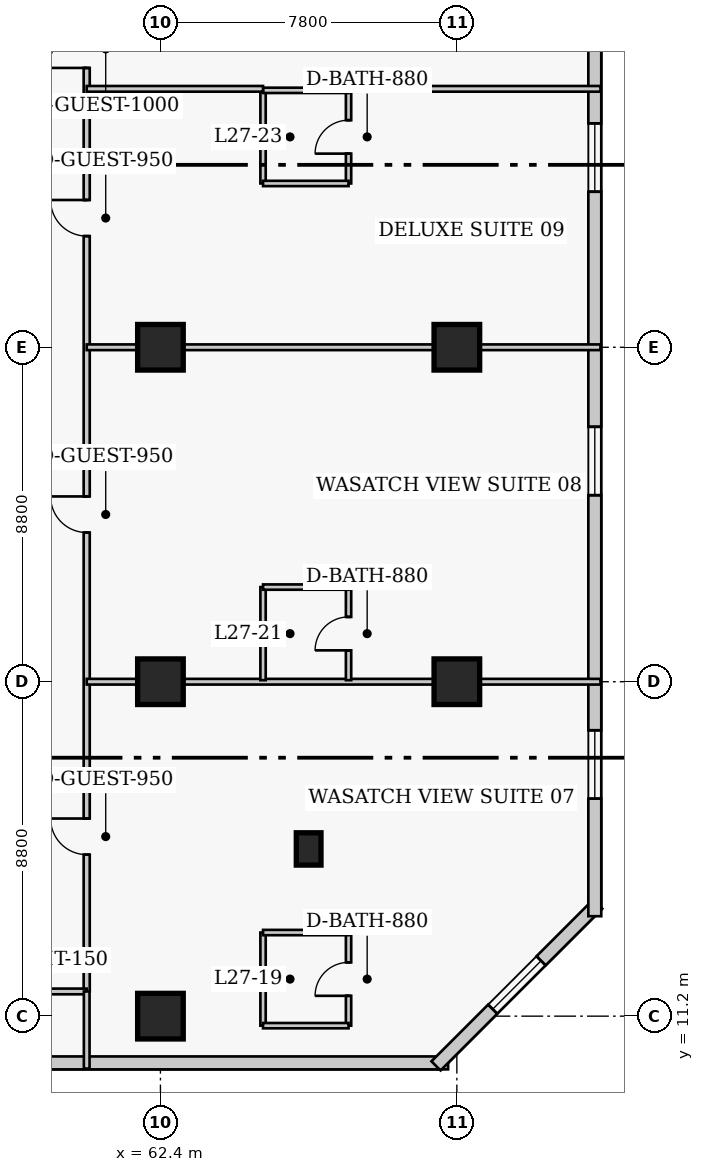
"""IFC4 building model, lengths in metres.
Left out: names, types, materials, properties, quantities, classifications, styles, units other than length and angle.
Written with IfcOpenShell. Run it as: python <this file> out.ifc"""

import sys

from ifc_helpers import new_model, si_unit, direction, frame, frame_2d, origin, origin_2d, place, context, subcontext, project, spatial, rectangle, extrude, element, fill, save


model = new_model("IFC4")
c1 = context("Model", 3, precision=1e-05, world=origin(), true_north=direction((0.0, 1.0)))
c2 = subcontext(c1, "Body", "Model", "MODEL_VIEW")
j1 = project(units=[si_unit("LENGTHUNIT", "METRE"), si_unit("PLANEANGLEUNIT", "RADIAN")], contexts=[c1])
p1 = place(None, origin())
s1 = spatial("IfcSite", under=j1, at=p1, CompositionType="ELEMENT")
p2 = place(p1, origin())
s2 = spatial("IfcBuilding", under=s1, at=p2, CompositionType="ELEMENT")
p3 = place(p2, frame((0.0, 0.0, 110.8)))
s3 = spatial("IfcBuildingStorey", under=s2, at=p3, CompositionType="ELEMENT", Elevation=110.8)
for number, where, z_axis, x_axis in (
    (1, (62.4, 11.2, 0.0), (0.0, 0.0, 1.0), (1.0, 0.0, 0.0)),
    (2, (62.4, 20.0, 0.0), (0.0, 0.0, 1.0), (1.0, 0.0, 0.0)),
    (3, (62.4, 28.8, 0.0), (0.0, 0.0, 1.0), (1.0, 0.0, 0.0)),
    (4, (70.2, 20.0, 0.0), (0.0, 0.0, 1.0), (1.0, 0.0, 0.0)),
    (5, (70.2, 28.8, 0.0), (0.0, 0.0, 1.0), (1.0, 0.0, 0.0)),
):
    element("IfcColumn", number, at=place(p3, frame(where, z_axis=z_axis, x_axis=x_axis)), inside=s3, PredefinedType="COLUMN", context=c2, shape_type="SweptSolid", body=[
        extrude(rectangle(XDim=1.2, YDim=1.2, at=origin_2d()), origin(), (0.0, 0.0, 1.0), 3.8),
    ])
p4 = place(p3, frame((66.3, 15.6, 0.0), z_axis=(0.0, 0.0, 1.0), x_axis=(1.0, 0.0, 0.0)))
e6 = element("IfcColumn", 6, at=p4, inside=s3, PredefinedType="PILASTER", context=c2, shape_type="SweptSolid", body=[
    extrude(rectangle(XDim=0.65, YDim=0.85, at=origin_2d()), origin(), (0.0, 0.0, 1.0), 3.8),
])
p5 = place(p3, frame((41.68, 9.97, 0.0), z_axis=(0.0, 0.0, 1.0), x_axis=(1.0, 0.0, 0.0)))
e7 = element("IfcWall", 7, at=p5, inside=s3, PredefinedType="SOLIDWALL", context=c2, shape_type="SweptSolid", body=[
    extrude(rectangle(XDim=28.29, YDim=0.34, at=frame_2d((14.145, 0.0))), origin(), (0.0, 0.0, 1.0), 3.54),
])
p6 = place(p5, frame((8.32, 0.0, 0.0)))
e8 = element("IfcOpeningElement", 8, at=p6, cuts=e7, PredefinedType="OPENING", context=c2, shape_type="SweptSolid", body=[
    extrude(rectangle(XDim=1.4, YDim=2.15, at=frame_2d((0.7, 1.075))), frame((0.0, 0.18, 0.0), z_axis=(0.0, -1.0, 0.0), x_axis=(1.0, 0.0, 0.0)), (0.0, 0.0, 1.0), 0.36),
])
p7 = place(p5, frame((2.665, 0.0, 0.85)))
e9 = element("IfcOpeningElement", 9, at=p7, cuts=e7, PredefinedType="OPENING", context=c2, shape_type="SweptSolid", body=[
    extrude(rectangle(XDim=1.8, YDim=1.8, at=frame_2d((0.9, 0.9))), frame((0.0, 0.18, 0.0), z_axis=(0.0, -1.0, 0.0), x_axis=(1.0, 0.0, 0.0)), (0.0, 0.0, 1.0), 0.36),
])
p8 = place(p5, frame((13.895, 0.0, 0.85)))
e10 = element("IfcOpeningElement", 10, at=p8, cuts=e7, PredefinedType="OPENING", context=c2, shape_type="SweptSolid", body=[
    extrude(rectangle(XDim=1.8, YDim=1.8, at=frame_2d((0.9, 0.9))), frame((0.0, 0.18, 0.0), z_axis=(0.0, -1.0, 0.0), x_axis=(1.0, 0.0, 0.0)), (0.0, 0.0, 1.0), 0.36),
])
p9 = place(p3, frame((69.652, 9.892, 0.0), z_axis=(0.0, 0.0, 1.0), x_axis=(0.707106781187, 0.707106781187, 0.0)))
e11 = element("IfcWall", 11, at=p9, inside=s3, PredefinedType="SOLIDWALL", context=c2, shape_type="SweptSolid", body=[
    extrude(rectangle(XDim=6.02, YDim=0.34, at=frame_2d((3.01, 0.0))), origin(), (0.0, 0.0, 1.0), 3.54),
])
p10 = place(p9, frame((2.11, 0.0, 0.85)))
e12 = element("IfcOpeningElement", 12, at=p10, cuts=e11, PredefinedType="OPENING", context=c2, shape_type="SweptSolid", body=[
    extrude(rectangle(XDim=1.8, YDim=1.8, at=frame_2d((0.9, 0.9))), frame((0.0, 0.18, 0.0), z_axis=(0.0, -1.0, 0.0), x_axis=(1.0, 0.0, 0.0)), (0.0, 0.0, 1.0), 0.36),
])
p11 = place(p3, frame((73.83, 13.83, 0.0), z_axis=(0.0, 0.0, 1.0), x_axis=(0.0, 1.0, 0.0)))
e13 = element("IfcWall", 13, at=p11, inside=s3, PredefinedType="SOLIDWALL", context=c2, shape_type="SweptSolid", body=[
    extrude(rectangle(XDim=31.94, YDim=0.34, at=frame_2d((15.97, 0.0))), origin(), (0.0, 0.0, 1.0), 3.54),
])
p12 = place(p11, frame((3.093, 0.0, 0.85)))
e14 = element("IfcOpeningElement", 14, at=p12, cuts=e13, PredefinedType="OPENING", context=c2, shape_type="SweptSolid", body=[
    extrude(rectangle(XDim=1.8, YDim=1.8, at=frame_2d((0.9, 0.9))), frame((0.0, 0.18, 0.0), z_axis=(0.0, -1.0, 0.0), x_axis=(1.0, 0.0, 0.0)), (0.0, 0.0, 1.0), 0.36),
])
p13 = place(p11, frame((11.077, 0.0, 0.85)))
e15 = element("IfcOpeningElement", 15, at=p13, cuts=e13, PredefinedType="OPENING", context=c2, shape_type="SweptSolid", body=[
    extrude(rectangle(XDim=1.8, YDim=1.8, at=frame_2d((0.9, 0.9))), frame((0.0, 0.18, 0.0), z_axis=(0.0, -1.0, 0.0), x_axis=(1.0, 0.0, 0.0)), (0.0, 0.0, 1.0), 0.36),
])
p14 = place(p11, frame((19.062, 0.0, 0.85)))
e16 = element("IfcOpeningElement", 16, at=p14, cuts=e13, PredefinedType="OPENING", context=c2, shape_type="SweptSolid", body=[
    extrude(rectangle(XDim=1.8, YDim=1.8, at=frame_2d((0.9, 0.9))), frame((0.0, 0.18, 0.0), z_axis=(0.0, -1.0, 0.0), x_axis=(1.0, 0.0, 0.0)), (0.0, 0.0, 1.0), 0.36),
])
p15 = place(p11, frame((27.048, 0.0, 0.85)))
e17 = element("IfcOpeningElement", 17, at=p15, cuts=e13, PredefinedType="OPENING", context=c2, shape_type="SweptSolid", body=[
    extrude(rectangle(XDim=1.8, YDim=1.8, at=frame_2d((0.9, 0.9))), frame((0.0, 0.18, 0.0), z_axis=(0.0, -1.0, 0.0), x_axis=(1.0, 0.0, 0.0)), (0.0, 0.0, 1.0), 0.36),
])
p16 = place(p3, frame((60.46, 11.85, 0.0), z_axis=(0.0, 0.0, 1.0), x_axis=(0.0, 1.0, 0.0)))
e18 = element("IfcWall", 18, at=p16, inside=s3, PredefinedType="PARTITIONING", context=c2, shape_type="SweptSolid", body=[
    extrude(rectangle(XDim=28.8, YDim=0.16, at=frame_2d((14.4, 0.0))), origin(), (0.0, 0.0, 1.0), 3.54),
])
p17 = place(p16, frame((3.6, 0.0, 0.0)))
e19 = element("IfcOpeningElement", 19, at=p17, cuts=e18, PredefinedType="OPENING", context=c2, shape_type="SweptSolid", body=[
    extrude(rectangle(XDim=0.95, YDim=2.1, at=frame_2d((0.475, 1.05))), frame((0.0, 0.09, 0.0), z_axis=(0.0, -1.0, 0.0), x_axis=(1.0, 0.0, 0.0)), (0.0, 0.0, 1.0), 0.18),
])
p18 = place(p16, frame((12.075, 0.0, 0.0)))
e20 = element("IfcOpeningElement", 20, at=p18, cuts=e18, PredefinedType="OPENING", context=c2, shape_type="SweptSolid", body=[
    extrude(rectangle(XDim=0.95, YDim=2.1, at=frame_2d((0.475, 1.05))), frame((0.0, 0.09, 0.0), z_axis=(0.0, -1.0, 0.0), x_axis=(1.0, 0.0, 0.0)), (0.0, 0.0, 1.0), 0.18),
])
p19 = place(p16, frame((19.875, 0.0, 0.0)))
e21 = element("IfcOpeningElement", 21, at=p19, cuts=e18, PredefinedType="OPENING", context=c2, shape_type="SweptSolid", body=[
    extrude(rectangle(XDim=0.95, YDim=2.1, at=frame_2d((0.475, 1.05))), frame((0.0, 0.09, 0.0), z_axis=(0.0, -1.0, 0.0), x_axis=(1.0, 0.0, 0.0)), (0.0, 0.0, 1.0), 0.18),
])
p20 = place(p16, frame((24.3, 0.0, 0.0)))
e22 = element("IfcOpeningElement", 22, at=p20, cuts=e18, PredefinedType="OPENING", context=c2, shape_type="SweptSolid", body=[
    extrude(rectangle(XDim=1.0, YDim=2.15, at=frame_2d((0.5, 1.075))), frame((0.0, 0.09, 0.0), z_axis=(0.0, -1.0, 0.0), x_axis=(1.0, 0.0, 0.0)), (0.0, 0.0, 1.0), 0.18),
])
p21 = place(p3, frame((58.24, 11.85, 0.0), z_axis=(0.0, 0.0, 1.0), x_axis=(1.0, 0.0, 0.0)))
e23 = element("IfcWall", 23, at=p21, inside=s3, PredefinedType="PARTITIONING", context=c2, shape_type="SweptSolid", body=[
    extrude(rectangle(XDim=2.22, YDim=0.15, at=frame_2d((1.11, 0.0))), origin(), (0.0, 0.0, 1.0), 3.54),
])
p22 = place(p3, frame((60.46, 9.82, 0.0), z_axis=(0.0, 0.0, 1.0), x_axis=(0.0, 1.0, 0.0)))
e24 = element("IfcWall", 24, at=p22, inside=s3, PredefinedType="PARTITIONING", context=c2, shape_type="SweptSolid", body=[
    extrude(rectangle(XDim=2.03, YDim=0.15, at=frame_2d((1.015, 0.0))), origin(), (0.0, 0.0, 1.0), 3.54),
])
p23 = place(p3, frame((65.1, 10.95, 0.0), z_axis=(0.0, 0.0, 1.0), x_axis=(0.0, 1.0, 0.0)))
e25 = element("IfcWall", 25, at=p23, inside=s3, PredefinedType="PLUMBINGWALL", context=c2, shape_type="SweptSolid", body=[
    extrude(rectangle(XDim=2.45, YDim=0.14, at=frame_2d((1.225, 0.0))), origin(), (0.0, 0.0, 1.0), 3.54),
])
p24 = place(p3, frame((67.35, 10.95, 0.0), z_axis=(0.0, 0.0, 1.0), x_axis=(0.0, 1.0, 0.0)))
e26 = element("IfcWall", 26, at=p24, inside=s3, PredefinedType="PLUMBINGWALL", context=c2, shape_type="SweptSolid", body=[
    extrude(rectangle(XDim=2.45, YDim=0.14, at=frame_2d((1.225, 0.0))), origin(), (0.0, 0.0, 1.0), 3.54),
])
p25 = place(p24, frame((0.785, 0.0, 0.0)))
e27 = element("IfcOpeningElement", 27, at=p25, cuts=e26, PredefinedType="OPENING", context=c2, shape_type="SweptSolid", body=[
    extrude(rectangle(XDim=0.88, YDim=2.05, at=frame_2d((0.44, 1.025))), frame((0.0, 0.08, 0.0), z_axis=(0.0, -1.0, 0.0), x_axis=(1.0, 0.0, 0.0)), (0.0, 0.0, 1.0), 0.16),
])
for number, where, z_axis, x_axis in (
    (28, (65.1, 10.95, 0.0), (0.0, 0.0, 1.0), (1.0, 0.0, 0.0)),
    (29, (65.1, 13.4, 0.0), (0.0, 0.0, 1.0), (1.0, 0.0, 0.0)),
):
    element("IfcWall", number, at=place(p3, frame(where, z_axis=z_axis, x_axis=x_axis)), inside=s3, PredefinedType="PLUMBINGWALL", context=c2, shape_type="SweptSolid", body=[
        extrude(rectangle(XDim=2.25, YDim=0.14, at=frame_2d((1.125, 0.0))), origin(), (0.0, 0.0, 1.0), 3.54),
    ])
p26 = place(p3, frame((60.46, 20.0, 0.0), z_axis=(0.0, 0.0, 1.0), x_axis=(1.0, 0.0, 0.0)))
e30 = element("IfcWall", 30, at=p26, inside=s3, PredefinedType="PARTITIONING", context=c2, shape_type="SweptSolid", body=[
    extrude(rectangle(XDim=13.52, YDim=0.15, at=frame_2d((6.76, 0.0))), origin(), (0.0, 0.0, 1.0), 2.679),
])
p27 = place(p3, frame((65.1, 20.04, 0.0), z_axis=(0.0, 0.0, 1.0), x_axis=(0.0, 1.0, 0.0)))
e31 = element("IfcWall", 31, at=p27, inside=s3, PredefinedType="PLUMBINGWALL", context=c2, shape_type="SweptSolid", body=[
    extrude(rectangle(XDim=2.45, YDim=0.14, at=frame_2d((1.225, 0.0))), origin(), (0.0, 0.0, 1.0), 3.54),
])
p28 = place(p3, frame((67.35, 20.04, 0.0), z_axis=(0.0, 0.0, 1.0), x_axis=(0.0, 1.0, 0.0)))
e32 = element("IfcWall", 32, at=p28, inside=s3, PredefinedType="PLUMBINGWALL", context=c2, shape_type="SweptSolid", body=[
    extrude(rectangle(XDim=2.45, YDim=0.14, at=frame_2d((1.225, 0.0))), origin(), (0.0, 0.0, 1.0), 3.54),
])
p29 = place(p28, frame((0.785, 0.0, 0.0)))
e33 = element("IfcOpeningElement", 33, at=p29, cuts=e32, PredefinedType="OPENING", context=c2, shape_type="SweptSolid", body=[
    extrude(rectangle(XDim=0.88, YDim=2.05, at=frame_2d((0.44, 1.025))), frame((0.0, 0.08, 0.0), z_axis=(0.0, -1.0, 0.0), x_axis=(1.0, 0.0, 0.0)), (0.0, 0.0, 1.0), 0.16),
])
p30 = place(p3, frame((65.1, 22.49, 0.0), z_axis=(0.0, 0.0, 1.0), x_axis=(1.0, 0.0, 0.0)))
e34 = element("IfcWall", 34, at=p30, inside=s3, PredefinedType="PLUMBINGWALL", context=c2, shape_type="SweptSolid", body=[
    extrude(rectangle(XDim=2.25, YDim=0.14, at=frame_2d((1.125, 0.0))), origin(), (0.0, 0.0, 1.0), 3.54),
])
p31 = place(p3, frame((60.46, 28.8, 0.0), z_axis=(0.0, 0.0, 1.0), x_axis=(1.0, 0.0, 0.0)))
e35 = element("IfcWall", 35, at=p31, inside=s3, PredefinedType="PARTITIONING", context=c2, shape_type="SweptSolid", body=[
    extrude(rectangle(XDim=13.52, YDim=0.15, at=frame_2d((6.76, 0.0))), origin(), (0.0, 0.0, 1.0), 2.679),
])
p32 = place(p3, frame((65.1, 33.11, 0.0), z_axis=(0.0, 0.0, 1.0), x_axis=(0.0, 1.0, 0.0)))
e36 = element("IfcWall", 36, at=p32, inside=s3, PredefinedType="PLUMBINGWALL", context=c2, shape_type="SweptSolid", body=[
    extrude(rectangle(XDim=2.45, YDim=0.14, at=frame_2d((1.225, 0.0))), origin(), (0.0, 0.0, 1.0), 3.54),
])
p33 = place(p3, frame((67.35, 33.11, 0.0), z_axis=(0.0, 0.0, 1.0), x_axis=(0.0, 1.0, 0.0)))
e37 = element("IfcWall", 37, at=p33, inside=s3, PredefinedType="PLUMBINGWALL", context=c2, shape_type="SweptSolid", body=[
    extrude(rectangle(XDim=2.45, YDim=0.14, at=frame_2d((1.225, 0.0))), origin(), (0.0, 0.0, 1.0), 3.54),
])
p34 = place(p33, frame((0.785, 0.0, 0.0)))
e38 = element("IfcOpeningElement", 38, at=p34, cuts=e37, PredefinedType="OPENING", context=c2, shape_type="SweptSolid", body=[
    extrude(rectangle(XDim=0.88, YDim=2.05, at=frame_2d((0.44, 1.025))), frame((0.0, 0.08, 0.0), z_axis=(0.0, -1.0, 0.0), x_axis=(1.0, 0.0, 0.0)), (0.0, 0.0, 1.0), 0.16),
])
for number, where, z_axis, x_axis in (
    (39, (65.1, 33.11, 0.0), (0.0, 0.0, 1.0), (1.0, 0.0, 0.0)),
    (40, (65.1, 35.56, 0.0), (0.0, 0.0, 1.0), (1.0, 0.0, 0.0)),
):
    element("IfcWall", number, at=place(p3, frame(where, z_axis=z_axis, x_axis=x_axis)), inside=s3, PredefinedType="PLUMBINGWALL", context=c2, shape_type="SweptSolid", body=[
        extrude(rectangle(XDim=2.25, YDim=0.14, at=frame_2d((1.125, 0.0))), origin(), (0.0, 0.0, 1.0), 3.54),
    ])
p35 = place(p3, frame((60.46, 35.6, 0.0), z_axis=(0.0, 0.0, 1.0), x_axis=(1.0, 0.0, 0.0)))
e41 = element("IfcWall", 41, at=p35, inside=s3, PredefinedType="PARTITIONING", context=c2, shape_type="SweptSolid", body=[
    extrude(rectangle(XDim=4.64, YDim=0.15, at=frame_2d((2.32, 0.0))), origin(), (0.0, 0.0, 1.0), 3.54),
])
p36 = place(p3, frame((67.35, 35.6, 0.0), z_axis=(0.0, 0.0, 1.0), x_axis=(1.0, 0.0, 0.0)))
e42 = element("IfcWall", 42, at=p36, inside=s3, PredefinedType="PARTITIONING", context=c2, shape_type="SweptSolid", body=[
    extrude(rectangle(XDim=6.63, YDim=0.15, at=frame_2d((3.315, 0.0))), origin(), (0.0, 0.0, 1.0), 3.54),
])
p37 = place(p10, origin())
e43 = element("IfcWindow", 43, at=p37, inside=s3, PartitioningType="SINGLE_PANEL", PredefinedType="WINDOW", context=c2, shape_type="SweptSolid", body=[
    extrude(rectangle(XDim=1.8, YDim=1.8, at=frame_2d((0.9, 0.9))), frame((0.0, 0.03, 0.0), z_axis=(0.0, -1.0, 0.0), x_axis=(1.0, 0.0, 0.0)), (0.0, 0.0, 1.0), 0.06),
])
fill(e12, e43)
p38 = place(p12, origin())
e44 = element("IfcWindow", 44, at=p38, inside=s3, PartitioningType="SINGLE_PANEL", PredefinedType="WINDOW", context=c2, shape_type="SweptSolid", body=[
    extrude(rectangle(XDim=1.8, YDim=1.8, at=frame_2d((0.9, 0.9))), frame((0.0, 0.03, 0.0), z_axis=(0.0, -1.0, 0.0), x_axis=(1.0, 0.0, 0.0)), (0.0, 0.0, 1.0), 0.06),
])
fill(e14, e44)
p39 = place(p13, origin())
e45 = element("IfcWindow", 45, at=p39, inside=s3, PartitioningType="SINGLE_PANEL", PredefinedType="WINDOW", context=c2, shape_type="SweptSolid", body=[
    extrude(rectangle(XDim=1.8, YDim=1.8, at=frame_2d((0.9, 0.9))), frame((0.0, 0.03, 0.0), z_axis=(0.0, -1.0, 0.0), x_axis=(1.0, 0.0, 0.0)), (0.0, 0.0, 1.0), 0.06),
])
fill(e15, e45)
p40 = place(p14, origin())
e46 = element("IfcWindow", 46, at=p40, inside=s3, PartitioningType="SINGLE_PANEL", PredefinedType="WINDOW", context=c2, shape_type="SweptSolid", body=[
    extrude(rectangle(XDim=1.8, YDim=1.8, at=frame_2d((0.9, 0.9))), frame((0.0, 0.03, 0.0), z_axis=(0.0, -1.0, 0.0), x_axis=(1.0, 0.0, 0.0)), (0.0, 0.0, 1.0), 0.06),
])
fill(e16, e46)
p41 = place(p25, origin())
e47 = element("IfcDoor", 47, at=p41, inside=s3, OperationType="SINGLE_SWING_LEFT", PredefinedType="DOOR", context=c2, shape_type="SweptSolid", body=[
    extrude(rectangle(XDim=0.88, YDim=2.05, at=frame_2d((0.44, 1.025))), frame((0.0, 0.025, 0.0), z_axis=(0.0, -1.0, 0.0), x_axis=(1.0, 0.0, 0.0)), (0.0, 0.0, 1.0), 0.05),
])
fill(e27, e47)
p42 = place(p17, origin())
e48 = element("IfcDoor", 48, at=p42, inside=s3, OperationType="SINGLE_SWING_RIGHT", PredefinedType="DOOR", context=c2, shape_type="SweptSolid", body=[
    extrude(rectangle(XDim=0.95, YDim=2.1, at=frame_2d((0.475, 1.05))), frame((0.0, 0.025, 0.0), z_axis=(0.0, -1.0, 0.0), x_axis=(1.0, 0.0, 0.0)), (0.0, 0.0, 1.0), 0.05),
])
fill(e19, e48)
p43 = place(p29, origin())
e49 = element("IfcDoor", 49, at=p43, inside=s3, OperationType="SINGLE_SWING_LEFT", PredefinedType="DOOR", context=c2, shape_type="SweptSolid", body=[
    extrude(rectangle(XDim=0.88, YDim=2.05, at=frame_2d((0.44, 1.025))), frame((0.0, 0.025, 0.0), z_axis=(0.0, -1.0, 0.0), x_axis=(1.0, 0.0, 0.0)), (0.0, 0.0, 1.0), 0.05),
])
fill(e33, e49)
p44 = place(p18, origin())
e50 = element("IfcDoor", 50, at=p44, inside=s3, OperationType="SINGLE_SWING_RIGHT", PredefinedType="DOOR", context=c2, shape_type="SweptSolid", body=[
    extrude(rectangle(XDim=0.95, YDim=2.1, at=frame_2d((0.475, 1.05))), frame((0.0, 0.025, 0.0), z_axis=(0.0, -1.0, 0.0), x_axis=(1.0, 0.0, 0.0)), (0.0, 0.0, 1.0), 0.05),
])
fill(e20, e50)
p45 = place(p34, origin())
e51 = element("IfcDoor", 51, at=p45, inside=s3, OperationType="SINGLE_SWING_LEFT", PredefinedType="DOOR", context=c2, shape_type="SweptSolid", body=[
    extrude(rectangle(XDim=0.88, YDim=2.05, at=frame_2d((0.44, 1.025))), frame((0.0, 0.025, 0.0), z_axis=(0.0, -1.0, 0.0), x_axis=(1.0, 0.0, 0.0)), (0.0, 0.0, 1.0), 0.05),
])
fill(e38, e51)
p46 = place(p19, origin())
e52 = element("IfcDoor", 52, at=p46, inside=s3, OperationType="SINGLE_SWING_RIGHT", PredefinedType="DOOR", context=c2, shape_type="SweptSolid", body=[
    extrude(rectangle(XDim=0.95, YDim=2.1, at=frame_2d((0.475, 1.05))), frame((0.0, 0.025, 0.0), z_axis=(0.0, -1.0, 0.0), x_axis=(1.0, 0.0, 0.0)), (0.0, 0.0, 1.0), 0.05),
])
fill(e21, e52)
p47 = place(p20, origin())
e53 = element("IfcDoor", 53, at=p47, inside=s3, OperationType="SINGLE_SWING_LEFT", PredefinedType="DOOR", context=c2, shape_type="SweptSolid", body=[
    extrude(rectangle(XDim=1.0, YDim=2.15, at=frame_2d((0.5, 1.075))), frame((0.0, 0.025, 0.0), z_axis=(0.0, -1.0, 0.0), x_axis=(1.0, 0.0, 0.0)), (0.0, 0.0, 1.0), 0.05),
])
fill(e22, e53)
save(model, sys.argv[1])
